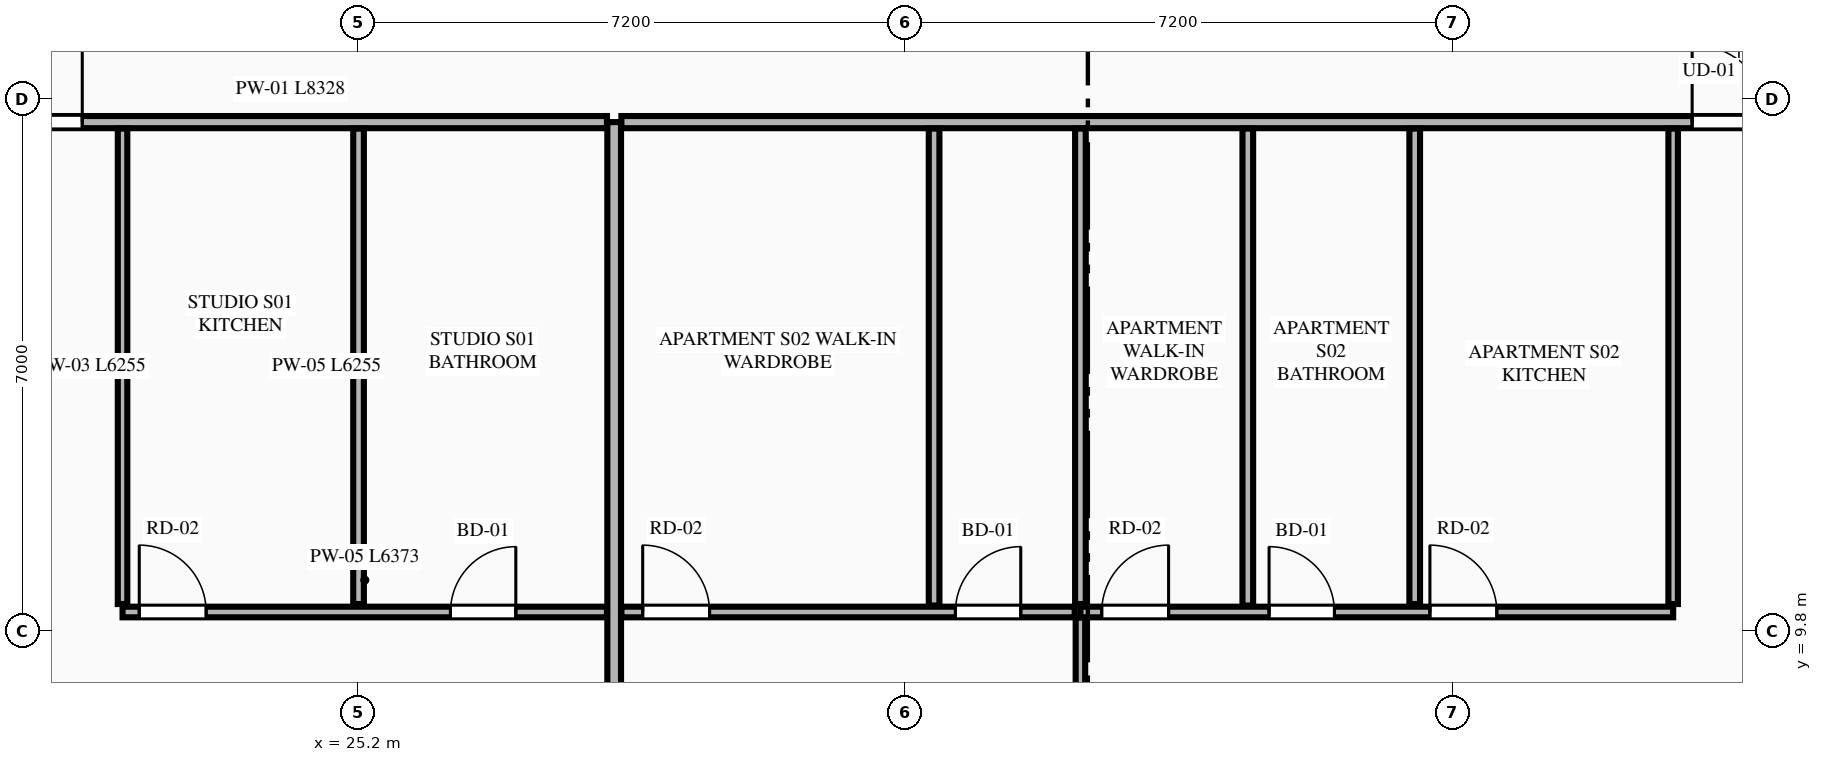
"""IFC4 building model, lengths in metres.
Left out: names, types, materials, properties, quantities, classifications, styles, units other than length and angle.
Written with IfcOpenShell. Run it as: python <this file> out.ifc"""

import sys

from ifc_helpers import new_model, si_unit, direction, frame, frame_2d, origin, place, context, subcontext, project, spatial, rectangle, extrude, element, fill, save


model = new_model("IFC4")
c1 = context("Model", 3, precision=1e-05, world=origin(), true_north=direction((0.0, 1.0)))
c2 = subcontext(c1, "Body", "Model", "MODEL_VIEW")
j1 = project(units=[si_unit("LENGTHUNIT", "METRE"), si_unit("PLANEANGLEUNIT", "RADIAN")], contexts=[c1])
p1 = place(None, origin())
s1 = spatial("IfcSite", under=j1, at=p1, CompositionType="ELEMENT")
p2 = place(p1, origin())
s2 = spatial("IfcBuilding", under=s1, at=p2, CompositionType="ELEMENT")
p3 = place(p2, frame((0.0, 0.0, 130.35)))
s3 = spatial("IfcBuildingStorey", under=s2, at=p3, CompositionType="ELEMENT", Elevation=130.35)
p4 = place(p3, frame((28.568, 4.105, 0.0), z_axis=(0.0, 0.0, 1.0), x_axis=(0.0, 1.0, 0.0)))
e1 = element("IfcWall", 1, at=p4, inside=s3, PredefinedType="PARTITIONING", context=c2, shape_type="SweptSolid", body=[
    extrude(rectangle(XDim=12.395, YDim=0.18, at=frame_2d((6.198, 0.0))), origin(), (0.0, 0.0, 1.0), 2.722),
])
p5 = place(p3, frame((20.145, 16.5, 0.0), z_axis=(0.0, 0.0, 1.0), x_axis=(1.0, 0.0, 0.0)))
e2 = element("IfcWall", 2, at=p5, inside=s3, PredefinedType="PARTITIONING", context=c2, shape_type="SweptSolid", body=[
    extrude(rectangle(XDim=8.328, YDim=0.16, at=frame_2d((4.164, 0.0))), origin(), (0.0, 0.0, 1.0), 3.34),
])
p6 = place(p5, frame((0.405, 0.0, 0.0)))
e3 = element("IfcOpeningElement", 3, at=p6, cuts=e2, PredefinedType="OPENING", context=c2, shape_type="SweptSolid", body=[
    extrude(rectangle(XDim=1.02, YDim=2.25, at=frame_2d((0.51, 1.125))), frame((0.0, 0.09, 0.0), z_axis=(0.0, -1.0, 0.0), x_axis=(1.0, 0.0, 0.0)), (0.0, 0.0, 1.0), 0.18),
])
p7 = place(p3, frame((22.1, 10.16, 0.0), z_axis=(0.0, 0.0, 1.0), x_axis=(0.0, 1.0, 0.0)))
e4 = element("IfcWall", 4, at=p7, inside=s3, PredefinedType="PARTITIONING", context=c2, shape_type="SweptSolid", body=[
    extrude(rectangle(XDim=6.255, YDim=0.125, at=frame_2d((3.127, 0.0))), origin(), (0.0, 0.0, 1.0), 2.722),
])
p8 = place(p3, frame((22.1, 10.055, 0.0), z_axis=(0.0, 0.0, 1.0), x_axis=(1.0, 0.0, 0.0)))
e5 = element("IfcWall", 5, at=p8, inside=s3, PredefinedType="PLUMBINGWALL", context=c2, shape_type="SweptSolid", body=[
    extrude(rectangle(XDim=6.373, YDim=0.14, at=frame_2d((3.187, 0.0))), origin(), (0.0, 0.0, 1.0), 3.34),
])
p9 = place(p8, frame((4.314, 0.0, 0.0)))
e6 = element("IfcOpeningElement", 6, at=p9, cuts=e5, PredefinedType="OPENING", context=c2, shape_type="SweptSolid", body=[
    extrude(rectangle(XDim=0.86, YDim=2.1, at=frame_2d((0.43, 1.05))), frame((0.0, 0.08, 0.0), z_axis=(0.0, -1.0, 0.0), x_axis=(1.0, 0.0, 0.0)), (0.0, 0.0, 1.0), 0.16),
])
p10 = place(p8, frame((0.22, 0.0, 0.0)))
e7 = element("IfcOpeningElement", 7, at=p10, cuts=e5, PredefinedType="OPENING", context=c2, shape_type="SweptSolid", body=[
    extrude(rectangle(XDim=0.88, YDim=2.15, at=frame_2d((0.44, 1.075))), frame((0.0, 0.08, 0.0), z_axis=(0.0, -1.0, 0.0), x_axis=(1.0, 0.0, 0.0)), (0.0, 0.0, 1.0), 0.16),
])
p11 = place(p3, frame((25.205, 10.16, 0.0), z_axis=(0.0, 0.0, 1.0), x_axis=(0.0, 1.0, 0.0)))
e8 = element("IfcWall", 8, at=p11, inside=s3, PredefinedType="PLUMBINGWALL", context=c2, shape_type="SweptSolid", body=[
    extrude(rectangle(XDim=6.255, YDim=0.14, at=frame_2d((3.127, 0.0))), origin(), (0.0, 0.0, 1.0), 3.34),
])
p12 = place(p3, frame((28.663, 16.5, 0.0), z_axis=(0.0, 0.0, 1.0), x_axis=(1.0, 0.0, 0.0)))
e9 = element("IfcWall", 9, at=p12, inside=s3, PredefinedType="PARTITIONING", context=c2, shape_type="SweptSolid", body=[
    extrude(rectangle(XDim=15.992, YDim=0.16, at=frame_2d((7.996, 0.0))), origin(), (0.0, 0.0, 1.0), 3.34),
])
p13 = place(p12, frame((14.087, 0.0, 0.0)))
e10 = element("IfcOpeningElement", 10, at=p13, cuts=e9, PredefinedType="OPENING", context=c2, shape_type="SweptSolid", body=[
    extrude(rectangle(XDim=1.02, YDim=2.25, at=frame_2d((0.51, 1.125))), frame((0.0, 0.09, 0.0), z_axis=(0.0, -1.0, 0.0), x_axis=(1.0, 0.0, 0.0)), (0.0, 0.0, 1.0), 0.18),
])
p14 = place(p3, frame((42.5, 10.16, 0.0), z_axis=(0.0, 0.0, 1.0), x_axis=(0.0, 1.0, 0.0)))
e11 = element("IfcWall", 11, at=p14, inside=s3, PredefinedType="PARTITIONING", context=c2, shape_type="SweptSolid", body=[
    extrude(rectangle(XDim=6.255, YDim=0.125, at=frame_2d((3.127, 0.0))), origin(), (0.0, 0.0, 1.0), 2.722),
])
p15 = place(p3, frame((34.702, 10.055, 0.0), z_axis=(0.0, 0.0, 1.0), x_axis=(1.0, 0.0, 0.0)))
e12 = element("IfcWall", 12, at=p15, inside=s3, PredefinedType="PLUMBINGWALL", context=c2, shape_type="SweptSolid", body=[
    extrude(rectangle(XDim=7.798, YDim=0.14, at=frame_2d((3.899, 0.0))), origin(), (0.0, 0.0, 1.0), 3.34),
])
p16 = place(p15, frame((0.28, 0.0, 0.0)))
e13 = element("IfcOpeningElement", 13, at=p16, cuts=e12, PredefinedType="OPENING", context=c2, shape_type="SweptSolid", body=[
    extrude(rectangle(XDim=0.88, YDim=2.15, at=frame_2d((0.44, 1.075))), frame((0.0, 0.08, 0.0), z_axis=(0.0, -1.0, 0.0), x_axis=(1.0, 0.0, 0.0)), (0.0, 0.0, 1.0), 0.16),
])
p17 = place(p15, frame((2.482, 0.0, 0.0)))
e14 = element("IfcOpeningElement", 14, at=p17, cuts=e12, PredefinedType="OPENING", context=c2, shape_type="SweptSolid", body=[
    extrude(rectangle(XDim=0.86, YDim=2.1, at=frame_2d((0.43, 1.05))), frame((0.0, 0.08, 0.0), z_axis=(0.0, -1.0, 0.0), x_axis=(1.0, 0.0, 0.0)), (0.0, 0.0, 1.0), 0.16),
])
p18 = place(p15, frame((4.598, 0.0, 0.0)))
e15 = element("IfcOpeningElement", 15, at=p18, cuts=e12, PredefinedType="OPENING", context=c2, shape_type="SweptSolid", body=[
    extrude(rectangle(XDim=0.88, YDim=2.15, at=frame_2d((0.44, 1.075))), frame((0.0, 0.08, 0.0), z_axis=(0.0, -1.0, 0.0), x_axis=(1.0, 0.0, 0.0)), (0.0, 0.0, 1.0), 0.16),
])
p19 = place(p3, frame((28.663, 10.055, 0.0), z_axis=(0.0, 0.0, 1.0), x_axis=(1.0, 0.0, 0.0)))
e16 = element("IfcWall", 16, at=p19, inside=s3, PredefinedType="PLUMBINGWALL", context=c2, shape_type="SweptSolid", body=[
    extrude(rectangle(XDim=5.964, YDim=0.14, at=frame_2d((2.982, 0.0))), origin(), (0.0, 0.0, 1.0), 3.34),
])
p20 = place(p19, frame((0.28, 0.0, 0.0)))
e17 = element("IfcOpeningElement", 17, at=p20, cuts=e16, PredefinedType="OPENING", context=c2, shape_type="SweptSolid", body=[
    extrude(rectangle(XDim=0.88, YDim=2.15, at=frame_2d((0.44, 1.075))), frame((0.0, 0.08, 0.0), z_axis=(0.0, -1.0, 0.0), x_axis=(1.0, 0.0, 0.0)), (0.0, 0.0, 1.0), 0.16),
])
p21 = place(p19, frame((4.394, 0.0, 0.0)))
e18 = element("IfcOpeningElement", 18, at=p21, cuts=e16, PredefinedType="OPENING", context=c2, shape_type="SweptSolid", body=[
    extrude(rectangle(XDim=0.86, YDim=2.1, at=frame_2d((0.43, 1.05))), frame((0.0, 0.08, 0.0), z_axis=(0.0, -1.0, 0.0), x_axis=(1.0, 0.0, 0.0)), (0.0, 0.0, 1.0), 0.16),
])
for number, where, z_axis, x_axis in (
    (19, (39.1, 10.16, 0.0), (0.0, 0.0, 1.0), (0.0, 1.0, 0.0)),
    (20, (34.702, 10.16, 0.0), (0.0, 0.0, 1.0), (0.0, 1.0, 0.0)),
):
    element("IfcWall", number, at=place(p3, frame(where, z_axis=z_axis, x_axis=x_axis)), inside=s3, PredefinedType="PLUMBINGWALL", context=c2, shape_type="SweptSolid", body=[
        extrude(rectangle(XDim=6.255, YDim=0.14, at=frame_2d((3.127, 0.0))), origin(), (0.0, 0.0, 1.0), 3.34),
    ])
p22 = place(p3, frame((34.702, 4.015, 0.0), z_axis=(0.0, 0.0, 1.0), x_axis=(0.0, 1.0, 0.0)))
e21 = element("IfcWall", 21, at=p22, inside=s3, PredefinedType="PARTITIONING", context=c2, shape_type="SweptSolid", body=[
    extrude(rectangle(XDim=5.965, YDim=0.125, at=frame_2d((2.982, 0.0))), origin(), (0.0, 0.0, 1.0), 3.34),
])
p23 = place(p22, frame((1.05, 0.0, 0.0)))
e22 = element("IfcOpeningElement", 22, at=p23, cuts=e21, PredefinedType="OPENING", context=c2, shape_type="SweptSolid", body=[
    extrude(rectangle(XDim=0.92, YDim=2.15, at=frame_2d((0.46, 1.075))), frame((0.0, 0.073, 0.0), z_axis=(0.0, -1.0, 0.0), x_axis=(1.0, 0.0, 0.0)), (0.0, 0.0, 1.0), 0.145),
])
for number, where, z_axis, x_axis in (
    (23, (36.904, 10.14, 0.0), (0.0, 0.0, 1.0), (0.0, 1.0, 0.0)),
    (24, (32.777, 10.14, 0.0), (0.0, 0.0, 1.0), (0.0, 1.0, 0.0)),
):
    element("IfcWall", number, at=place(p3, frame(where, z_axis=z_axis, x_axis=x_axis)), inside=s3, PredefinedType="PLUMBINGWALL", context=c2, shape_type="SweptSolid", body=[
        extrude(rectangle(XDim=6.275, YDim=0.14, at=frame_2d((3.138, 0.0))), origin(), (0.0, 0.0, 1.0), 3.34),
    ])
p24 = place(p9, origin())
e25 = element("IfcDoor", 25, at=p24, inside=s3, OperationType="SINGLE_SWING_RIGHT", PredefinedType="DOOR", context=c2, shape_type="SweptSolid", body=[
    extrude(rectangle(XDim=0.86, YDim=2.1, at=frame_2d((0.43, 1.05))), frame((0.0, 0.025, 0.0), z_axis=(0.0, -1.0, 0.0), x_axis=(1.0, 0.0, 0.0)), (0.0, 0.0, 1.0), 0.05),
])
fill(e6, e25)
p25 = place(p6, origin())
e26 = element("IfcDoor", 26, at=p25, inside=s3, OperationType="SINGLE_SWING_RIGHT", PredefinedType="DOOR", context=c2, shape_type="SweptSolid", body=[
    extrude(rectangle(XDim=1.02, YDim=2.25, at=frame_2d((0.51, 1.125))), frame((0.0, 0.025, 0.0), z_axis=(0.0, -1.0, 0.0), x_axis=(1.0, 0.0, 0.0)), (0.0, 0.0, 1.0), 0.05),
])
fill(e3, e26)
p26 = place(p10, origin())
e27 = element("IfcDoor", 27, at=p26, inside=s3, OperationType="SINGLE_SWING_LEFT", PredefinedType="DOOR", context=c2, shape_type="SweptSolid", body=[
    extrude(rectangle(XDim=0.88, YDim=2.15, at=frame_2d((0.44, 1.075))), frame((0.0, 0.025, 0.0), z_axis=(0.0, -1.0, 0.0), x_axis=(1.0, 0.0, 0.0)), (0.0, 0.0, 1.0), 0.05),
])
fill(e7, e27)
p27 = place(p16, origin())
e28 = element("IfcDoor", 28, at=p27, inside=s3, OperationType="SINGLE_SWING_RIGHT", PredefinedType="DOOR", context=c2, shape_type="SweptSolid", body=[
    extrude(rectangle(XDim=0.88, YDim=2.15, at=frame_2d((0.44, 1.075))), frame((0.0, 0.025, 0.0), z_axis=(0.0, -1.0, 0.0), x_axis=(1.0, 0.0, 0.0)), (0.0, 0.0, 1.0), 0.05),
])
fill(e13, e28)
p28 = place(p17, origin())
e29 = element("IfcDoor", 29, at=p28, inside=s3, OperationType="SINGLE_SWING_LEFT", PredefinedType="DOOR", context=c2, shape_type="SweptSolid", body=[
    extrude(rectangle(XDim=0.86, YDim=2.1, at=frame_2d((0.43, 1.05))), frame((0.0, 0.025, 0.0), z_axis=(0.0, -1.0, 0.0), x_axis=(1.0, 0.0, 0.0)), (0.0, 0.0, 1.0), 0.05),
])
fill(e14, e29)
p29 = place(p20, origin())
e30 = element("IfcDoor", 30, at=p29, inside=s3, OperationType="SINGLE_SWING_LEFT", PredefinedType="DOOR", context=c2, shape_type="SweptSolid", body=[
    extrude(rectangle(XDim=0.88, YDim=2.15, at=frame_2d((0.44, 1.075))), frame((0.0, 0.025, 0.0), z_axis=(0.0, -1.0, 0.0), x_axis=(1.0, 0.0, 0.0)), (0.0, 0.0, 1.0), 0.05),
])
fill(e17, e30)
p30 = place(p21, origin())
e31 = element("IfcDoor", 31, at=p30, inside=s3, OperationType="SINGLE_SWING_RIGHT", PredefinedType="DOOR", context=c2, shape_type="SweptSolid", body=[
    extrude(rectangle(XDim=0.86, YDim=2.1, at=frame_2d((0.43, 1.05))), frame((0.0, 0.025, 0.0), z_axis=(0.0, -1.0, 0.0), x_axis=(1.0, 0.0, 0.0)), (0.0, 0.0, 1.0), 0.05),
])
fill(e18, e31)
p31 = place(p13, origin())
e32 = element("IfcDoor", 32, at=p31, inside=s3, OperationType="SINGLE_SWING_LEFT", PredefinedType="DOOR", context=c2, shape_type="SweptSolid", body=[
    extrude(rectangle(XDim=1.02, YDim=2.25, at=frame_2d((0.51, 1.125))), frame((0.0, 0.025, 0.0), z_axis=(0.0, -1.0, 0.0), x_axis=(1.0, 0.0, 0.0)), (0.0, 0.0, 1.0), 0.05),
])
fill(e10, e32)
p32 = place(p18, origin())
e33 = element("IfcDoor", 33, at=p32, inside=s3, OperationType="SINGLE_SWING_LEFT", PredefinedType="DOOR", context=c2, shape_type="SweptSolid", body=[
    extrude(rectangle(XDim=0.88, YDim=2.15, at=frame_2d((0.44, 1.075))), frame((0.0, 0.025, 0.0), z_axis=(0.0, -1.0, 0.0), x_axis=(1.0, 0.0, 0.0)), (0.0, 0.0, 1.0), 0.05),
])
fill(e15, e33)
save(model, sys.argv[1])
